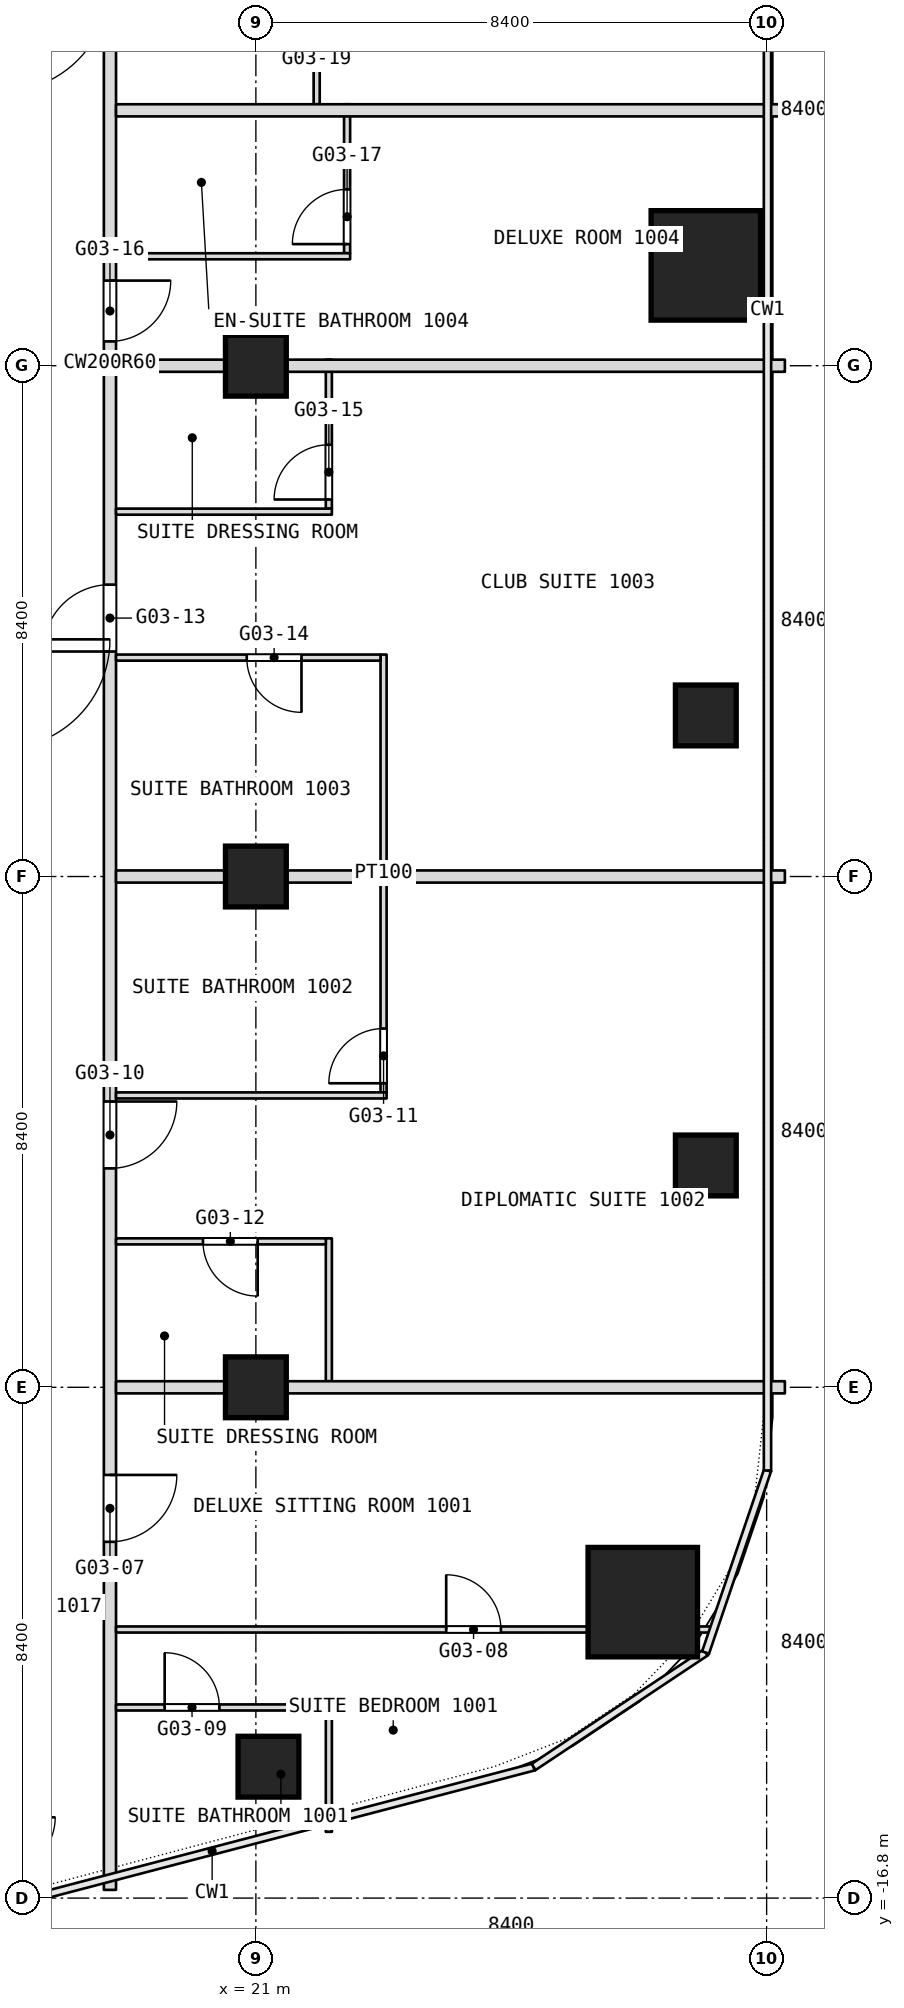
"""IFC4 building model, lengths in metres.
Left out: names, types, materials, properties, quantities, classifications, styles, units other than length and angle.
Written with IfcOpenShell. Run it as: python <this file> out.ifc"""

import sys

from ifc_helpers import new_model, si_unit, direction, frame, frame_2d, origin, origin_2d, place, context, subcontext, project, spatial, rectangle, extrude, element, fill, save


model = new_model("IFC4")
c1 = context("Model", 3, precision=1e-05, world=origin(), true_north=direction((0.0, 1.0)))
c2 = subcontext(c1, "Body", "Model", "MODEL_VIEW")
j1 = project(units=[si_unit("LENGTHUNIT", "METRE"), si_unit("PLANEANGLEUNIT", "RADIAN")], contexts=[c1])
p1 = place(None, origin())
s1 = spatial("IfcSite", under=j1, at=p1, CompositionType="ELEMENT")
p2 = place(p1, origin())
s2 = spatial("IfcBuilding", under=s1, at=p2, CompositionType="ELEMENT")
p3 = place(p2, frame((0.0, 0.0, 50.9)))
s3 = spatial("IfcBuildingStorey", under=s2, at=p3, CompositionType="ELEMENT", Elevation=50.9)
for number, where, z_axis, x_axis in (
    (1, (27.363, -11.933, 0.0), (0.0, 0.0, 1.0), (1.0, 0.0, 0.0)),
    (2, (28.4, 10.05, 0.0), (0.0, 0.0, 1.0), (1.0, 0.0, 0.0)),
):
    element("IfcColumn", number, at=place(p3, frame(where, z_axis=z_axis, x_axis=x_axis)), inside=s3, PredefinedType="COLUMN", context=c2, shape_type="SweptSolid", body=[
        extrude(rectangle(XDim=1.8, YDim=1.8, at=origin_2d()), origin(), (0.0, 0.0, 1.0), 3.6),
    ])
for number, where, z_axis, x_axis in (
    (3, (21.0, -8.4, 0.0), (0.0, 0.0, 1.0), (1.0, 0.0, 0.0)),
    (4, (21.0, 0.0, 0.0), (0.0, 0.0, 1.0), (1.0, 0.0, 0.0)),
    (5, (21.0, 8.4, 0.0), (0.0, 0.0, 1.0), (1.0, 0.0, 0.0)),
    (6, (28.4, 2.649, 0.0), (0.0, 0.0, 1.0), (1.0, 0.0, 0.0)),
    (7, (28.4, -4.752, 0.0), (0.0, 0.0, 1.0), (1.0, 0.0, 0.0)),
    (8, (21.207, -14.639, 0.0), (0.0, 0.0, 1.0), (1.0, 0.0, 0.0)),
):
    element("IfcColumn", number, at=place(p3, frame(where, z_axis=z_axis, x_axis=x_axis)), inside=s3, PredefinedType="COLUMN", context=c2, shape_type="SweptSolid", body=[
        extrude(rectangle(XDim=1.0, YDim=1.0, at=origin_2d()), origin(), (0.0, 0.0, 1.0), 3.6),
    ])
p4 = place(p3, frame((23.1, -3.55, 0.0), z_axis=(0.0, 0.0, 1.0), x_axis=(0.0, 1.0, 0.0)))
e9 = element("IfcWall", 9, at=p4, inside=s3, PredefinedType="PARTITIONING", context=c2, shape_type="SweptSolid", body=[
    extrude(rectangle(XDim=7.2, YDim=0.1, at=frame_2d((3.6, 0.0))), origin(), (0.0, 0.0, 1.0), 3.34),
])
p5 = place(p4, frame((0.15, 0.0, 0.0)))
e10 = element("IfcOpeningElement", 10, at=p5, cuts=e9, PredefinedType="OPENING", context=c2, shape_type="SweptSolid", body=[
    extrude(rectangle(XDim=0.9, YDim=2.1, at=frame_2d((0.45, 1.05))), frame((0.0, 0.05, 0.0), z_axis=(0.0, -1.0, 0.0), x_axis=(1.0, 0.0, 0.0)), (0.0, 0.0, 1.0), 0.1),
])
p6 = place(p3, frame((22.5, 10.25, 0.0), z_axis=(0.0, 0.0, 1.0), x_axis=(0.0, 1.0, 0.0)))
e11 = element("IfcWall", 11, at=p6, inside=s3, PredefinedType="PARTITIONING", context=c2, shape_type="SweptSolid", body=[
    extrude(rectangle(XDim=2.45, YDim=0.1, at=frame_2d((1.225, 0.0))), origin(), (0.0, 0.0, 1.0), 3.34),
])
p7 = place(p6, frame((0.15, 0.0, 0.0)))
e12 = element("IfcOpeningElement", 12, at=p7, cuts=e11, PredefinedType="OPENING", context=c2, shape_type="SweptSolid", body=[
    extrude(rectangle(XDim=0.9, YDim=2.1, at=frame_2d((0.45, 1.05))), frame((0.0, 0.05, 0.0), z_axis=(0.0, -1.0, 0.0), x_axis=(1.0, 0.0, 0.0)), (0.0, 0.0, 1.0), 0.1),
])
p8 = place(p3, frame((22.2, -15.71, 0.0), z_axis=(0.0, 0.0, 1.0), x_axis=(0.0, 1.0, 0.0)))
e13 = element("IfcWall", 13, at=p8, inside=s3, PredefinedType="PARTITIONING", context=c2, shape_type="SweptSolid", body=[
    extrude(rectangle(XDim=2.095, YDim=0.1, at=frame_2d((1.047, 0.0))), origin(), (0.0, 0.0, 1.0), 3.34),
])
p9 = place(p3, frame((22.2, -8.3, 0.0), z_axis=(0.0, 0.0, 1.0), x_axis=(0.0, 1.0, 0.0)))
e14 = element("IfcWall", 14, at=p9, inside=s3, PredefinedType="PARTITIONING", context=c2, shape_type="SweptSolid", body=[
    extrude(rectangle(XDim=2.35, YDim=0.1, at=frame_2d((1.175, 0.0))), origin(), (0.0, 0.0, 1.0), 3.34),
])
p10 = place(p3, frame((22.2, 6.05, 0.0), z_axis=(0.0, 0.0, 1.0), x_axis=(0.0, 1.0, 0.0)))
e15 = element("IfcWall", 15, at=p10, inside=s3, PredefinedType="PARTITIONING", context=c2, shape_type="SweptSolid", body=[
    extrude(rectangle(XDim=2.45, YDim=0.1, at=frame_2d((1.225, 0.0))), origin(), (0.0, 0.0, 1.0), 3.34),
])
p11 = place(p10, frame((0.15, 0.0, 0.0)))
e16 = element("IfcOpeningElement", 16, at=p11, cuts=e15, PredefinedType="OPENING", context=c2, shape_type="SweptSolid", body=[
    extrude(rectangle(XDim=0.9, YDim=2.1, at=frame_2d((0.45, 1.05))), frame((0.0, 0.05, 0.0), z_axis=(0.0, -1.0, 0.0), x_axis=(1.0, 0.0, 0.0)), (0.0, 0.0, 1.0), 0.1),
])
p12 = place(p3, frame((22.0, 12.7, 0.0), z_axis=(0.0, 0.0, 1.0), x_axis=(0.0, 1.0, 0.0)))
e17 = element("IfcWall", 17, at=p12, inside=s3, PredefinedType="PARTITIONING", context=c2, shape_type="SweptSolid", body=[
    extrude(rectangle(XDim=2.35, YDim=0.1, at=frame_2d((1.175, 0.0))), origin(), (0.0, 0.0, 1.0), 3.34),
])
p13 = place(p12, frame((1.3, 0.0, 0.0)))
e18 = element("IfcOpeningElement", 18, at=p13, cuts=e17, PredefinedType="OPENING", context=c2, shape_type="SweptSolid", body=[
    extrude(rectangle(XDim=0.9, YDim=2.1, at=frame_2d((0.45, 1.05))), frame((0.0, 0.05, 0.0), z_axis=(0.0, -1.0, 0.0), x_axis=(1.0, 0.0, 0.0)), (0.0, 0.0, 1.0), 0.1),
])
p14 = place(p3, frame((18.6, -16.665, 0.0), z_axis=(0.0, 0.0, 1.0), x_axis=(0.0, 1.0, 0.0)))
e19 = element("IfcWall", 19, at=p14, inside=s3, PredefinedType="PARTITIONING", context=c2, shape_type="SweptSolid", body=[
    extrude(rectangle(XDim=50.205, YDim=0.2, at=frame_2d((25.103, 0.0))), origin(), (0.0, 0.0, 1.0), 3.34),
])
p15 = place(p14, frame((5.724, 0.0, 0.0)))
e20 = element("IfcOpeningElement", 20, at=p15, cuts=e19, PredefinedType="OPENING", context=c2, shape_type="SweptSolid", body=[
    extrude(rectangle(XDim=1.1, YDim=2.1, at=frame_2d((0.55, 1.05))), frame((0.0, 0.1, 0.0), z_axis=(0.0, -1.0, 0.0), x_axis=(1.0, 0.0, 0.0)), (0.0, 0.0, 1.0), 0.2),
])
p16 = place(p14, frame((11.865, 0.0, 0.0)))
e21 = element("IfcOpeningElement", 21, at=p16, cuts=e19, PredefinedType="OPENING", context=c2, shape_type="SweptSolid", body=[
    extrude(rectangle(XDim=1.1, YDim=2.1, at=frame_2d((0.55, 1.05))), frame((0.0, 0.1, 0.0), z_axis=(0.0, -1.0, 0.0), x_axis=(1.0, 0.0, 0.0)), (0.0, 0.0, 1.0), 0.2),
])
p17 = place(p14, frame((20.365, 0.0, 0.0)))
e22 = element("IfcOpeningElement", 22, at=p17, cuts=e19, PredefinedType="OPENING", context=c2, shape_type="SweptSolid", body=[
    extrude(rectangle(XDim=1.1, YDim=2.1, at=frame_2d((0.55, 1.05))), frame((0.0, 0.1, 0.0), z_axis=(0.0, -1.0, 0.0), x_axis=(1.0, 0.0, 0.0)), (0.0, 0.0, 1.0), 0.2),
])
p18 = place(p14, frame((25.465, 0.0, 0.0)))
e23 = element("IfcOpeningElement", 23, at=p18, cuts=e19, PredefinedType="OPENING", context=c2, shape_type="SweptSolid", body=[
    extrude(rectangle(XDim=1.0, YDim=2.1, at=frame_2d((0.5, 1.05))), frame((0.0, 0.1, 0.0), z_axis=(0.0, -1.0, 0.0), x_axis=(1.0, 0.0, 0.0)), (0.0, 0.0, 1.0), 0.2),
])
p19 = place(p14, frame((32.065, 0.0, 0.0)))
e24 = element("IfcOpeningElement", 24, at=p19, cuts=e19, PredefinedType="OPENING", context=c2, shape_type="SweptSolid", body=[
    extrude(rectangle(XDim=1.0, YDim=2.1, at=frame_2d((0.5, 1.05))), frame((0.0, 0.1, 0.0), z_axis=(0.0, -1.0, 0.0), x_axis=(1.0, 0.0, 0.0)), (0.0, 0.0, 1.0), 0.2),
])
p20 = place(p14, frame((36.265, 0.0, 0.0)))
e25 = element("IfcOpeningElement", 25, at=p20, cuts=e19, PredefinedType="OPENING", context=c2, shape_type="SweptSolid", body=[
    extrude(rectangle(XDim=1.0, YDim=2.1, at=frame_2d((0.5, 1.05))), frame((0.0, 0.1, 0.0), z_axis=(0.0, -1.0, 0.0), x_axis=(1.0, 0.0, 0.0)), (0.0, 0.0, 1.0), 0.2),
])
p21 = place(p14, frame((38.065, 0.0, 0.0)))
e26 = element("IfcOpeningElement", 26, at=p21, cuts=e19, PredefinedType="OPENING", context=c2, shape_type="SweptSolid", body=[
    extrude(rectangle(XDim=1.0, YDim=2.1, at=frame_2d((0.5, 1.05))), frame((0.0, 0.1, 0.0), z_axis=(0.0, -1.0, 0.0), x_axis=(1.0, 0.0, 0.0)), (0.0, 0.0, 1.0), 0.2),
])
p22 = place(p14, frame((42.265, 0.0, 0.0)))
e27 = element("IfcOpeningElement", 27, at=p22, cuts=e19, PredefinedType="OPENING", context=c2, shape_type="SweptSolid", body=[
    extrude(rectangle(XDim=1.0, YDim=2.1, at=frame_2d((0.5, 1.05))), frame((0.0, 0.1, 0.0), z_axis=(0.0, -1.0, 0.0), x_axis=(1.0, 0.0, 0.0)), (0.0, 0.0, 1.0), 0.2),
])
p23 = place(p14, frame((47.465, 0.0, 0.0)))
e28 = element("IfcOpeningElement", 28, at=p23, cuts=e19, PredefinedType="OPENING", context=c2, shape_type="SweptSolid", body=[
    extrude(rectangle(XDim=1.0, YDim=2.1, at=frame_2d((0.5, 1.05))), frame((0.0, 0.1, 0.0), z_axis=(0.0, -1.0, 0.0), x_axis=(1.0, 0.0, 0.0)), (0.0, 0.0, 1.0), 0.2),
])
p24 = place(p3, frame((18.7, -13.665, 0.0), z_axis=(0.0, 0.0, 1.0), x_axis=(1.0, 0.0, 0.0)))
e29 = element("IfcWall", 29, at=p24, inside=s3, PredefinedType="PARTITIONING", context=c2, shape_type="SweptSolid", body=[
    extrude(rectangle(XDim=3.45, YDim=0.1, at=frame_2d((1.725, 0.0))), origin(), (0.0, 0.0, 1.0), 3.34),
])
p25 = place(p24, frame((0.8, 0.0, 0.0)))
e30 = element("IfcOpeningElement", 30, at=p25, cuts=e29, PredefinedType="OPENING", context=c2, shape_type="SweptSolid", body=[
    extrude(rectangle(XDim=0.9, YDim=2.1, at=frame_2d((0.45, 1.05))), frame((0.0, 0.05, 0.0), z_axis=(0.0, -1.0, 0.0), x_axis=(1.0, 0.0, 0.0)), (0.0, 0.0, 1.0), 0.1),
])
p26 = place(p3, frame((18.7, -12.383, 0.0), z_axis=(0.0, 0.0, 1.0), x_axis=(1.0, 0.0, 0.0)))
e31 = element("IfcWall", 31, at=p26, inside=s3, PredefinedType="PARTITIONING", context=c2, shape_type="SweptSolid", body=[
    extrude(rectangle(XDim=7.763, YDim=0.1, at=frame_2d((3.881, 0.0))), origin(), (0.0, 0.0, 1.0), 3.34),
])
p27 = place(p26, frame((5.43, 0.0, 0.0)))
e32 = element("IfcOpeningElement", 32, at=p27, cuts=e31, PredefinedType="OPENING", context=c2, shape_type="SweptSolid", body=[
    extrude(rectangle(XDim=0.9, YDim=2.1, at=frame_2d((0.45, 1.05))), frame((0.0, 0.05, 0.0), z_axis=(0.0, -1.0, 0.0), x_axis=(1.0, 0.0, 0.0)), (0.0, 0.0, 1.0), 0.1),
])
p28 = place(p3, frame((28.263, -12.383, 0.0), z_axis=(0.0, 0.0, 1.0), x_axis=(1.0, 0.0, 0.0)))
e33 = element("IfcWall", 33, at=p28, inside=s3, PredefinedType="PARTITIONING", context=c2, shape_type="SweptSolid", body=[
    extrude(rectangle(XDim=0.29, YDim=0.1, at=frame_2d((0.145, 0.0))), origin(), (0.0, 0.0, 1.0), 3.34),
])
p29 = place(p3, frame((18.7, -8.4, 0.0), z_axis=(0.0, 0.0, 1.0), x_axis=(1.0, 0.0, 0.0)))
e34 = element("IfcWall", 34, at=p29, inside=s3, PredefinedType="PARTITIONING", context=c2, shape_type="SweptSolid", body=[
    extrude(rectangle(XDim=11.0, YDim=0.2, at=frame_2d((5.5, 0.0))), origin(), (0.0, 0.0, 1.0), 2.84),
])
p30 = place(p3, frame((18.7, -6.0, 0.0), z_axis=(0.0, 0.0, 1.0), x_axis=(1.0, 0.0, 0.0)))
e35 = element("IfcWall", 35, at=p30, inside=s3, PredefinedType="PARTITIONING", context=c2, shape_type="SweptSolid", body=[
    extrude(rectangle(XDim=3.45, YDim=0.1, at=frame_2d((1.725, 0.0))), origin(), (0.0, 0.0, 1.0), 3.34),
])
p31 = place(p30, frame((1.43, 0.0, 0.0)))
e36 = element("IfcOpeningElement", 36, at=p31, cuts=e35, PredefinedType="OPENING", context=c2, shape_type="SweptSolid", body=[
    extrude(rectangle(XDim=0.9, YDim=2.1, at=frame_2d((0.45, 1.05))), frame((0.0, 0.05, 0.0), z_axis=(0.0, -1.0, 0.0), x_axis=(1.0, 0.0, 0.0)), (0.0, 0.0, 1.0), 0.1),
])
p32 = place(p3, frame((18.7, -3.6, 0.0), z_axis=(0.0, 0.0, 1.0), x_axis=(1.0, 0.0, 0.0)))
e37 = element("IfcWall", 37, at=p32, inside=s3, PredefinedType="PARTITIONING", context=c2, shape_type="SweptSolid", body=[
    extrude(rectangle(XDim=4.45, YDim=0.1, at=frame_2d((2.225, 0.0))), origin(), (0.0, 0.0, 1.0), 3.34),
])
p33 = place(p3, frame((18.7, 0.0, 0.0), z_axis=(0.0, 0.0, 1.0), x_axis=(1.0, 0.0, 0.0)))
e38 = element("IfcWall", 38, at=p33, inside=s3, PredefinedType="PARTITIONING", context=c2, shape_type="SweptSolid", body=[
    extrude(rectangle(XDim=11.0, YDim=0.2, at=frame_2d((5.5, 0.0))), origin(), (0.0, 0.0, 1.0), 2.84),
])
p34 = place(p3, frame((18.7, 3.6, 0.0), z_axis=(0.0, 0.0, 1.0), x_axis=(1.0, 0.0, 0.0)))
e39 = element("IfcWall", 39, at=p34, inside=s3, PredefinedType="PARTITIONING", context=c2, shape_type="SweptSolid", body=[
    extrude(rectangle(XDim=4.35, YDim=0.1, at=frame_2d((2.175, 0.0))), origin(), (0.0, 0.0, 1.0), 3.34),
])
p35 = place(p34, frame((2.15, 0.0, 0.0)))
e40 = element("IfcOpeningElement", 40, at=p35, cuts=e39, PredefinedType="OPENING", context=c2, shape_type="SweptSolid", body=[
    extrude(rectangle(XDim=0.9, YDim=2.1, at=frame_2d((0.45, 1.05))), frame((0.0, 0.05, 0.0), z_axis=(0.0, -1.0, 0.0), x_axis=(1.0, 0.0, 0.0)), (0.0, 0.0, 1.0), 0.1),
])
p36 = place(p3, frame((18.7, 6.0, 0.0), z_axis=(0.0, 0.0, 1.0), x_axis=(1.0, 0.0, 0.0)))
e41 = element("IfcWall", 41, at=p36, inside=s3, PredefinedType="PARTITIONING", context=c2, shape_type="SweptSolid", body=[
    extrude(rectangle(XDim=3.55, YDim=0.1, at=frame_2d((1.775, 0.0))), origin(), (0.0, 0.0, 1.0), 3.34),
])
p37 = place(p3, frame((18.7, 8.4, 0.0), z_axis=(0.0, 0.0, 1.0), x_axis=(1.0, 0.0, 0.0)))
e42 = element("IfcWall", 42, at=p37, inside=s3, PredefinedType="PARTITIONING", context=c2, shape_type="SweptSolid", body=[
    extrude(rectangle(XDim=11.0, YDim=0.2, at=frame_2d((5.5, 0.0))), origin(), (0.0, 0.0, 1.0), 2.84),
])
p38 = place(p3, frame((18.7, 10.2, 0.0), z_axis=(0.0, 0.0, 1.0), x_axis=(1.0, 0.0, 0.0)))
e43 = element("IfcWall", 43, at=p38, inside=s3, PredefinedType="PARTITIONING", context=c2, shape_type="SweptSolid", body=[
    extrude(rectangle(XDim=3.85, YDim=0.1, at=frame_2d((1.925, 0.0))), origin(), (0.0, 0.0, 1.0), 3.34),
])
p39 = place(p3, frame((18.7, 12.6, 0.0), z_axis=(0.0, 0.0, 1.0), x_axis=(1.0, 0.0, 0.0)))
e44 = element("IfcWall", 44, at=p39, inside=s3, PredefinedType="PARTITIONING", context=c2, shape_type="SweptSolid", body=[
    extrude(rectangle(XDim=11.0, YDim=0.2, at=frame_2d((5.5, 0.0))), origin(), (0.0, 0.0, 1.0), 3.34),
])
p40 = place(p5, origin())
e45 = element("IfcDoor", 45, at=p40, inside=s3, OperationType="SINGLE_SWING_LEFT", PredefinedType="DOOR", context=c2, shape_type="SweptSolid", body=[
    extrude(rectangle(XDim=0.9, YDim=2.1, at=frame_2d((0.45, 1.05))), frame((0.0, 0.025, 0.0), z_axis=(0.0, -1.0, 0.0), x_axis=(1.0, 0.0, 0.0)), (0.0, 0.0, 1.0), 0.05),
])
fill(e10, e45)
p41 = place(p7, origin())
e46 = element("IfcDoor", 46, at=p41, inside=s3, OperationType="SINGLE_SWING_LEFT", PredefinedType="DOOR", context=c2, shape_type="SweptSolid", body=[
    extrude(rectangle(XDim=0.9, YDim=2.1, at=frame_2d((0.45, 1.05))), frame((0.0, 0.025, 0.0), z_axis=(0.0, -1.0, 0.0), x_axis=(1.0, 0.0, 0.0)), (0.0, 0.0, 1.0), 0.05),
])
fill(e12, e46)
p42 = place(p11, origin())
e47 = element("IfcDoor", 47, at=p42, inside=s3, OperationType="SINGLE_SWING_LEFT", PredefinedType="DOOR", context=c2, shape_type="SweptSolid", body=[
    extrude(rectangle(XDim=0.9, YDim=2.1, at=frame_2d((0.45, 1.05))), frame((0.0, 0.025, 0.0), z_axis=(0.0, -1.0, 0.0), x_axis=(1.0, 0.0, 0.0)), (0.0, 0.0, 1.0), 0.05),
])
fill(e16, e47)
p43 = place(p15, origin())
e48 = element("IfcDoor", 48, at=p43, inside=s3, OperationType="SINGLE_SWING_LEFT", PredefinedType="DOOR", context=c2, shape_type="SweptSolid", body=[
    extrude(rectangle(XDim=1.1, YDim=2.1, at=frame_2d((0.55, 1.05))), frame((0.0, 0.025, 0.0), z_axis=(0.0, -1.0, 0.0), x_axis=(1.0, 0.0, 0.0)), (0.0, 0.0, 1.0), 0.05),
])
fill(e20, e48)
p44 = place(p16, origin())
e49 = element("IfcDoor", 49, at=p44, inside=s3, OperationType="SINGLE_SWING_LEFT", PredefinedType="DOOR", context=c2, shape_type="SweptSolid", body=[
    extrude(rectangle(XDim=1.1, YDim=2.1, at=frame_2d((0.55, 1.05))), frame((0.0, 0.025, 0.0), z_axis=(0.0, -1.0, 0.0), x_axis=(1.0, 0.0, 0.0)), (0.0, 0.0, 1.0), 0.05),
])
fill(e21, e49)
p45 = place(p17, origin())
e50 = element("IfcDoor", 50, at=p45, inside=s3, OperationType="SINGLE_SWING_RIGHT", PredefinedType="DOOR", context=c2, shape_type="SweptSolid", body=[
    extrude(rectangle(XDim=1.1, YDim=2.1, at=frame_2d((0.55, 1.05))), frame((0.0, 0.025, 0.0), z_axis=(0.0, -1.0, 0.0), x_axis=(1.0, 0.0, 0.0)), (0.0, 0.0, 1.0), 0.05),
])
fill(e22, e50)
p46 = place(p18, origin())
e51 = element("IfcDoor", 51, at=p46, inside=s3, OperationType="SINGLE_SWING_RIGHT", PredefinedType="DOOR", context=c2, shape_type="SweptSolid", body=[
    extrude(rectangle(XDim=1.0, YDim=2.1, at=frame_2d((0.5, 1.05))), frame((0.0, 0.025, 0.0), z_axis=(0.0, -1.0, 0.0), x_axis=(1.0, 0.0, 0.0)), (0.0, 0.0, 1.0), 0.05),
])
fill(e23, e51)
p47 = place(p25, origin())
e52 = element("IfcDoor", 52, at=p47, inside=s3, OperationType="SINGLE_SWING_LEFT", PredefinedType="DOOR", context=c2, shape_type="SweptSolid", body=[
    extrude(rectangle(XDim=0.9, YDim=2.1, at=frame_2d((0.45, 1.05))), frame((0.0, 0.025, 0.0), z_axis=(0.0, -1.0, 0.0), x_axis=(1.0, 0.0, 0.0)), (0.0, 0.0, 1.0), 0.05),
])
fill(e30, e52)
p48 = place(p27, origin())
e53 = element("IfcDoor", 53, at=p48, inside=s3, OperationType="SINGLE_SWING_LEFT", PredefinedType="DOOR", context=c2, shape_type="SweptSolid", body=[
    extrude(rectangle(XDim=0.9, YDim=2.1, at=frame_2d((0.45, 1.05))), frame((0.0, 0.025, 0.0), z_axis=(0.0, -1.0, 0.0), x_axis=(1.0, 0.0, 0.0)), (0.0, 0.0, 1.0), 0.05),
])
fill(e32, e53)
p49 = place(p31, origin())
e54 = element("IfcDoor", 54, at=p49, inside=s3, OperationType="SINGLE_SWING_LEFT", PredefinedType="DOOR", context=c2, shape_type="SweptSolid", body=[
    extrude(rectangle(XDim=0.9, YDim=2.1, at=frame_2d((0.45, 1.05))), frame((0.0, 0.025, 0.0), z_axis=(0.0, -1.0, 0.0), x_axis=(1.0, 0.0, 0.0)), (0.0, 0.0, 1.0), 0.05),
])
fill(e36, e54)
p50 = place(p35, origin())
e55 = element("IfcDoor", 55, at=p50, inside=s3, OperationType="SINGLE_SWING_LEFT", PredefinedType="DOOR", context=c2, shape_type="SweptSolid", body=[
    extrude(rectangle(XDim=0.9, YDim=2.1, at=frame_2d((0.45, 1.05))), frame((0.0, 0.025, 0.0), z_axis=(0.0, -1.0, 0.0), x_axis=(1.0, 0.0, 0.0)), (0.0, 0.0, 1.0), 0.05),
])
fill(e40, e55)
save(model, sys.argv[1])
